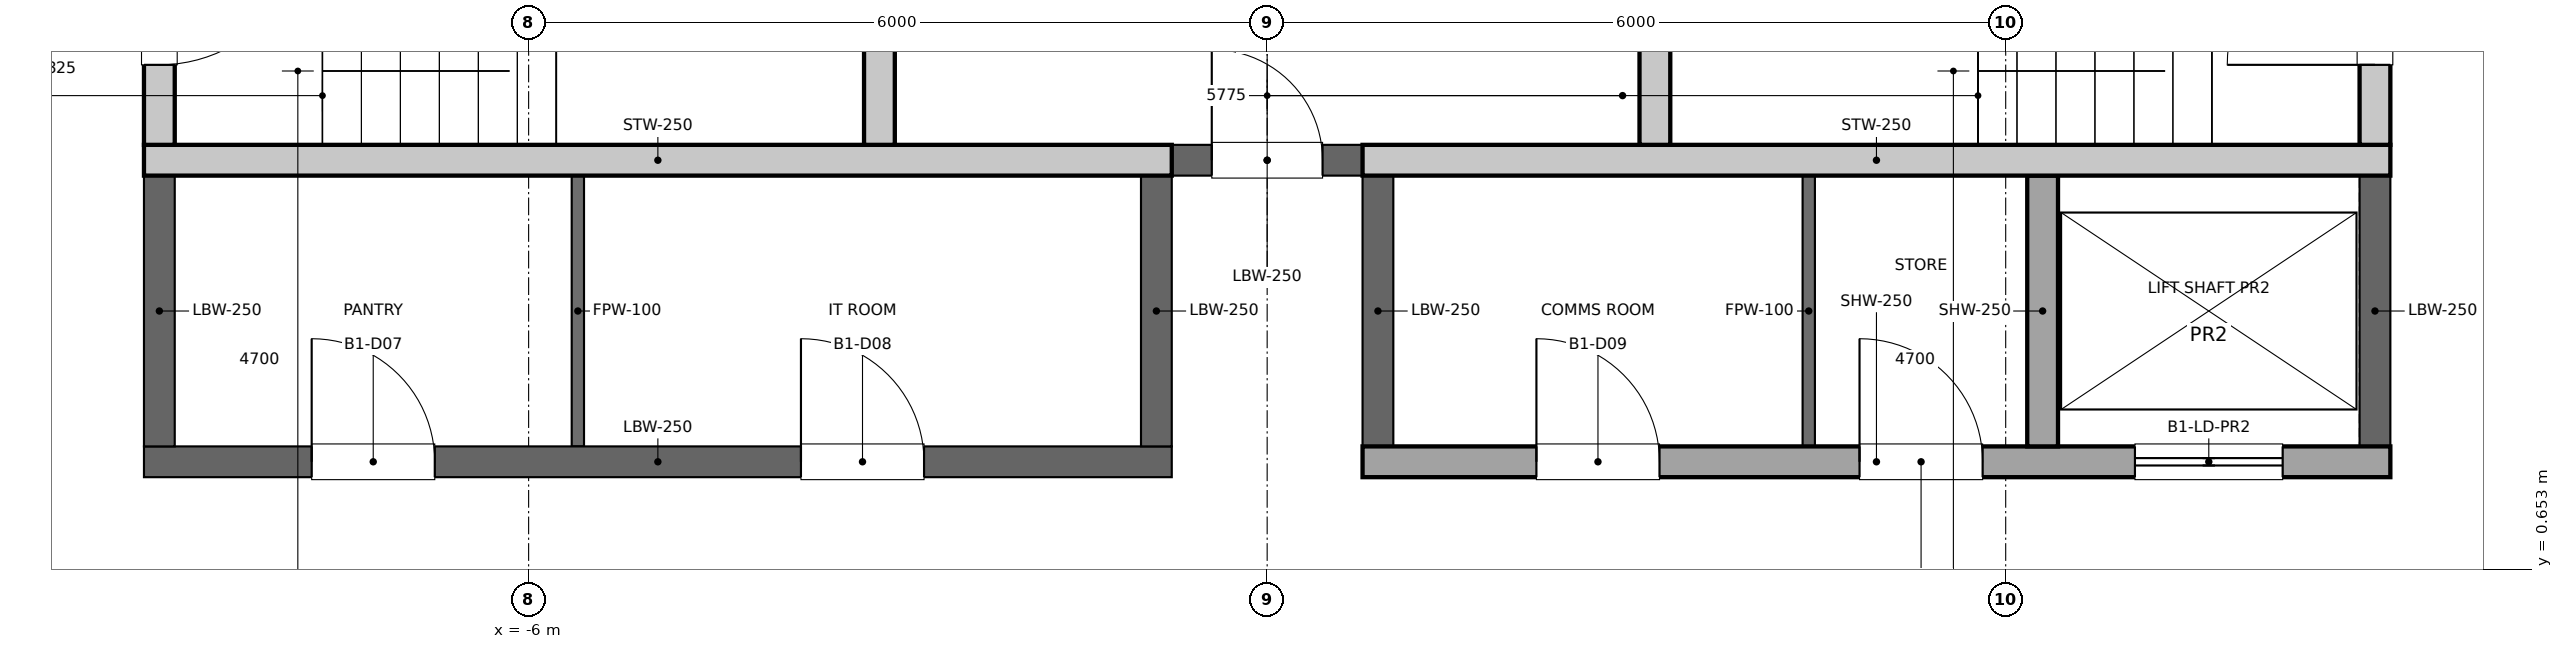
"""IFC4 building model, lengths in metres.
Left out: names, types, materials, properties, quantities, classifications, styles, units other than length and angle.
Written with IfcOpenShell. Run it as: python <this file> out.ifc"""

import sys

from ifc_helpers import new_model, si_unit, direction, frame, frame_2d, origin, place, context, subcontext, project, spatial, rectangle, extrude, element, fill, save


model = new_model("IFC4")
c1 = context("Model", 3, precision=1e-05, world=origin(), true_north=direction((0.0, 1.0)))
c2 = subcontext(c1, "Body", "Model", "MODEL_VIEW")
j1 = project(units=[si_unit("LENGTHUNIT", "METRE"), si_unit("PLANEANGLEUNIT", "RADIAN")], contexts=[c1])
p1 = place(None, origin())
s1 = spatial("IfcSite", under=j1, at=p1, CompositionType="ELEMENT")
p2 = place(p1, origin())
s2 = spatial("IfcBuilding", under=s1, at=p2, CompositionType="ELEMENT")
p3 = place(p2, frame((0.0, 0.0, -5.0)))
s3 = spatial("IfcBuildingStorey", under=s2, at=p3, CompositionType="ELEMENT", Elevation=-5.0)
p4 = place(p3, frame((-9.0, 4.1, 0.0), z_axis=(0.0, 0.0, 1.0), x_axis=(0.0, 1.0, 0.0)))
e1 = element("IfcWall", 1, at=p4, inside=s3, PredefinedType="SOLIDWALL", context=c2, shape_type="SweptSolid", body=[
    extrude(rectangle(XDim=2.5, YDim=0.25, at=frame_2d((1.25, 0.0))), origin(), (0.0, 0.0, 1.0), 4.7),
])
p5 = place(p4, frame((0.65, 0.0, 0.0)))
e2 = element("IfcOpeningElement", 2, at=p5, cuts=e1, PredefinedType="OPENING", context=c2, shape_type="SweptSolid", body=[
    extrude(rectangle(XDim=1.2, YDim=2.1, at=frame_2d((0.6, 1.05))), frame((0.0, 0.125, 0.0), z_axis=(0.0, -1.0, 0.0), x_axis=(1.0, 0.0, 0.0)), (0.0, 0.0, 1.0), 0.25),
])
p6 = place(p3, frame((9.0, 4.1, 0.0), z_axis=(0.0, 0.0, 1.0), x_axis=(0.0, 1.0, 0.0)))
e3 = element("IfcWall", 3, at=p6, inside=s3, PredefinedType="SOLIDWALL", context=c2, shape_type="SweptSolid", body=[
    extrude(rectangle(XDim=2.5, YDim=0.25, at=frame_2d((1.25, 0.0))), origin(), (0.0, 0.0, 1.0), 4.7),
])
p7 = place(p6, frame((0.65, 0.0, 0.0)))
e4 = element("IfcOpeningElement", 4, at=p7, cuts=e3, PredefinedType="OPENING", context=c2, shape_type="SweptSolid", body=[
    extrude(rectangle(XDim=1.2, YDim=2.1, at=frame_2d((0.6, 1.05))), frame((0.0, 0.125, 0.0), z_axis=(0.0, -1.0, 0.0), x_axis=(1.0, 0.0, 0.0)), (0.0, 0.0, 1.0), 0.25),
])
for number, where, z_axis, x_axis in (
    (5, (-3.15, 4.1, 0.0), (0.0, 0.0, 1.0), (0.0, 1.0, 0.0)),
    (6, (3.15, 4.1, 0.0), (0.0, 0.0, 1.0), (0.0, 1.0, 0.0)),
):
    element("IfcWall", number, at=place(p3, frame(where, z_axis=z_axis, x_axis=x_axis)), inside=s3, PredefinedType="SOLIDWALL", context=c2, shape_type="SweptSolid", body=[
        extrude(rectangle(XDim=2.5, YDim=0.25, at=frame_2d((1.25, 0.0))), origin(), (0.0, 0.0, 1.0), 4.7),
    ])
p8 = place(p3, frame((-0.775, 3.975, 0.0), z_axis=(0.0, 0.0, 1.0), x_axis=(1.0, 0.0, 0.0)))
e7 = element("IfcWall", 7, at=p8, inside=s3, PredefinedType="PARTITIONING", context=c2, shape_type="SweptSolid", body=[
    extrude(rectangle(XDim=1.55, YDim=0.25, at=frame_2d((0.775, 0.0))), origin(), (0.0, 0.0, 1.0), 4.7),
])
p9 = place(p8, frame((0.325, 0.0, 0.0)))
e8 = element("IfcOpeningElement", 8, at=p9, cuts=e7, PredefinedType="OPENING", context=c2, shape_type="SweptSolid", body=[
    extrude(rectangle(XDim=0.9, YDim=2.1, at=frame_2d((0.45, 1.05))), frame((0.0, 0.125, 0.0), z_axis=(0.0, -1.0, 0.0), x_axis=(1.0, 0.0, 0.0)), (0.0, 0.0, 1.0), 0.25),
])
p10 = place(p3, frame((-9.125, 1.525, 0.0), z_axis=(0.0, 0.0, 1.0), x_axis=(1.0, 0.0, 0.0)))
e9 = element("IfcWall", 9, at=p10, inside=s3, PredefinedType="PARTITIONING", context=c2, shape_type="SweptSolid", body=[
    extrude(rectangle(XDim=8.35, YDim=0.25, at=frame_2d((4.175, 0.0))), origin(), (0.0, 0.0, 1.0), 4.7),
])
p11 = place(p10, frame((1.363, 0.0, 0.0)))
e10 = element("IfcOpeningElement", 10, at=p11, cuts=e9, PredefinedType="OPENING", context=c2, shape_type="SweptSolid", body=[
    extrude(rectangle(XDim=1.0, YDim=2.1, at=frame_2d((0.5, 1.05))), frame((0.0, 0.125, 0.0), z_axis=(0.0, -1.0, 0.0), x_axis=(1.0, 0.0, 0.0)), (0.0, 0.0, 1.0), 0.25),
])
p12 = place(p10, frame((5.337, 0.0, 0.0)))
e11 = element("IfcOpeningElement", 11, at=p12, cuts=e9, PredefinedType="OPENING", context=c2, shape_type="SweptSolid", body=[
    extrude(rectangle(XDim=1.0, YDim=2.1, at=frame_2d((0.5, 1.05))), frame((0.0, 0.125, 0.0), z_axis=(0.0, -1.0, 0.0), x_axis=(1.0, 0.0, 0.0)), (0.0, 0.0, 1.0), 0.25),
])
p13 = place(p3, frame((0.775, 1.525, 0.0), z_axis=(0.0, 0.0, 1.0), x_axis=(1.0, 0.0, 0.0)))
e12 = element("IfcWall", 12, at=p13, inside=s3, PredefinedType="SOLIDWALL", context=c2, shape_type="SweptSolid", body=[
    extrude(rectangle(XDim=8.35, YDim=0.25, at=frame_2d((4.175, 0.0))), origin(), (0.0, 0.0, 1.0), 4.7),
])
p14 = place(p13, frame((6.275, 0.0, 0.0)))
e13 = element("IfcOpeningElement", 13, at=p14, cuts=e12, PredefinedType="OPENING", context=c2, shape_type="SweptSolid", body=[
    extrude(rectangle(XDim=1.2, YDim=2.1, at=frame_2d((0.6, 1.05))), frame((0.0, 0.125, 0.0), z_axis=(0.0, -1.0, 0.0), x_axis=(1.0, 0.0, 0.0)), (0.0, 0.0, 1.0), 0.25),
])
p15 = place(p13, frame((1.413, 0.0, 0.0)))
e14 = element("IfcOpeningElement", 14, at=p15, cuts=e12, PredefinedType="OPENING", context=c2, shape_type="SweptSolid", body=[
    extrude(rectangle(XDim=1.0, YDim=2.1, at=frame_2d((0.5, 1.05))), frame((0.0, 0.125, 0.0), z_axis=(0.0, -1.0, 0.0), x_axis=(1.0, 0.0, 0.0)), (0.0, 0.0, 1.0), 0.25),
])
p16 = place(p13, frame((4.038, 0.0, 0.0)))
e15 = element("IfcOpeningElement", 15, at=p16, cuts=e12, PredefinedType="OPENING", context=c2, shape_type="SweptSolid", body=[
    extrude(rectangle(XDim=1.0, YDim=2.1, at=frame_2d((0.5, 1.05))), frame((0.0, 0.125, 0.0), z_axis=(0.0, -1.0, 0.0), x_axis=(1.0, 0.0, 0.0)), (0.0, 0.0, 1.0), 0.25),
])
p17 = place(p3, frame((6.3, 1.65, 0.0), z_axis=(0.0, 0.0, 1.0), x_axis=(0.0, 1.0, 0.0)))
e16 = element("IfcWall", 16, at=p17, inside=s3, PredefinedType="SOLIDWALL", context=c2, shape_type="SweptSolid", body=[
    extrude(rectangle(XDim=2.2, YDim=0.25, at=frame_2d((1.1, 0.0))), origin(), (0.0, 0.0, 1.0), 4.7),
])
for number, where, z_axis, x_axis in (
    (17, (-9.125, 3.975, 0.0), (0.0, 0.0, 1.0), (1.0, 0.0, 0.0)),
    (18, (0.775, 3.975, 0.0), (0.0, 0.0, 1.0), (1.0, 0.0, 0.0)),
):
    element("IfcWall", number, at=place(p3, frame(where, z_axis=z_axis, x_axis=x_axis)), inside=s3, PredefinedType="SOLIDWALL", context=c2, shape_type="SweptSolid", body=[
        extrude(rectangle(XDim=8.35, YDim=0.25, at=frame_2d((4.175, 0.0))), origin(), (0.0, 0.0, 1.0), 4.7),
    ])
for number, where, z_axis, x_axis in (
    (19, (-9.0, 1.65, 0.0), (0.0, 0.0, 1.0), (0.0, 1.0, 0.0)),
    (20, (-0.9, 1.65, 0.0), (0.0, 0.0, 1.0), (0.0, 1.0, 0.0)),
    (21, (9.0, 1.65, 0.0), (0.0, 0.0, 1.0), (0.0, 1.0, 0.0)),
    (22, (0.9, 1.65, 0.0), (0.0, 0.0, 1.0), (0.0, 1.0, 0.0)),
):
    element("IfcWall", number, at=place(p3, frame(where, z_axis=z_axis, x_axis=x_axis)), inside=s3, PredefinedType="PARTITIONING", context=c2, shape_type="SweptSolid", body=[
        extrude(rectangle(XDim=2.2, YDim=0.25, at=frame_2d((1.1, 0.0))), origin(), (0.0, 0.0, 1.0), 4.7),
    ])
for number, where, z_axis, x_axis in (
    (23, (-5.6, 1.65, 0.0), (0.0, 0.0, 1.0), (0.0, 1.0, 0.0)),
    (24, (4.4, 1.65, 0.0), (0.0, 0.0, 1.0), (0.0, 1.0, 0.0)),
):
    element("IfcWall", number, at=place(p3, frame(where, z_axis=z_axis, x_axis=x_axis)), inside=s3, PredefinedType="PARTITIONING", context=c2, shape_type="SweptSolid", body=[
        extrude(rectangle(XDim=2.2, YDim=0.1, at=frame_2d((1.1, 0.0))), origin(), (0.0, 0.0, 1.0), 4.7),
    ])
p18 = place(p14, origin())
e25 = element("IfcDoor", 25, at=p18, inside=s3, OperationType="DOUBLE_DOOR_SLIDING", PredefinedType="DOOR", context=c2, shape_type="SweptSolid", body=[
    extrude(rectangle(XDim=1.2, YDim=2.1, at=frame_2d((0.6, 1.05))), frame((0.0, 0.025, 0.0), z_axis=(0.0, -1.0, 0.0), x_axis=(1.0, 0.0, 0.0)), (0.0, 0.0, 1.0), 0.05),
])
fill(e13, e25)
p19 = place(p5, origin())
e26 = element("IfcDoor", 26, at=p19, inside=s3, OperationType="SINGLE_SWING_RIGHT", PredefinedType="DOOR", context=c2, shape_type="SweptSolid", body=[
    extrude(rectangle(XDim=1.2, YDim=2.1, at=frame_2d((0.6, 1.05))), frame((0.0, 0.025, 0.0), z_axis=(0.0, -1.0, 0.0), x_axis=(1.0, 0.0, 0.0)), (0.0, 0.0, 1.0), 0.05),
])
fill(e2, e26)
p20 = place(p7, origin())
e27 = element("IfcDoor", 27, at=p20, inside=s3, OperationType="SINGLE_SWING_LEFT", PredefinedType="DOOR", context=c2, shape_type="SweptSolid", body=[
    extrude(rectangle(XDim=1.2, YDim=2.1, at=frame_2d((0.6, 1.05))), frame((0.0, 0.025, 0.0), z_axis=(0.0, -1.0, 0.0), x_axis=(1.0, 0.0, 0.0)), (0.0, 0.0, 1.0), 0.05),
])
fill(e4, e27)
p21 = place(p9, origin())
e28 = element("IfcDoor", 28, at=p21, inside=s3, OperationType="SINGLE_SWING_LEFT", PredefinedType="DOOR", context=c2, shape_type="SweptSolid", body=[
    extrude(rectangle(XDim=0.9, YDim=2.1, at=frame_2d((0.45, 1.05))), frame((0.0, 0.025, 0.0), z_axis=(0.0, -1.0, 0.0), x_axis=(1.0, 0.0, 0.0)), (0.0, 0.0, 1.0), 0.05),
])
fill(e8, e28)
p22 = place(p11, origin())
e29 = element("IfcDoor", 29, at=p22, inside=s3, OperationType="SINGLE_SWING_LEFT", PredefinedType="DOOR", context=c2, shape_type="SweptSolid", body=[
    extrude(rectangle(XDim=1.0, YDim=2.1, at=frame_2d((0.5, 1.05))), frame((0.0, 0.025, 0.0), z_axis=(0.0, -1.0, 0.0), x_axis=(1.0, 0.0, 0.0)), (0.0, 0.0, 1.0), 0.05),
])
fill(e10, e29)
p23 = place(p12, origin())
e30 = element("IfcDoor", 30, at=p23, inside=s3, OperationType="SINGLE_SWING_LEFT", PredefinedType="DOOR", context=c2, shape_type="SweptSolid", body=[
    extrude(rectangle(XDim=1.0, YDim=2.1, at=frame_2d((0.5, 1.05))), frame((0.0, 0.025, 0.0), z_axis=(0.0, -1.0, 0.0), x_axis=(1.0, 0.0, 0.0)), (0.0, 0.0, 1.0), 0.05),
])
fill(e11, e30)
p24 = place(p15, origin())
e31 = element("IfcDoor", 31, at=p24, inside=s3, OperationType="SINGLE_SWING_LEFT", PredefinedType="DOOR", context=c2, shape_type="SweptSolid", body=[
    extrude(rectangle(XDim=1.0, YDim=2.1, at=frame_2d((0.5, 1.05))), frame((0.0, 0.025, 0.0), z_axis=(0.0, -1.0, 0.0), x_axis=(1.0, 0.0, 0.0)), (0.0, 0.0, 1.0), 0.05),
])
fill(e14, e31)
p25 = place(p16, origin())
e32 = element("IfcDoor", 32, at=p25, inside=s3, OperationType="SINGLE_SWING_LEFT", PredefinedType="DOOR", context=c2, shape_type="SweptSolid", body=[
    extrude(rectangle(XDim=1.0, YDim=2.1, at=frame_2d((0.5, 1.05))), frame((0.0, 0.025, 0.0), z_axis=(0.0, -1.0, 0.0), x_axis=(1.0, 0.0, 0.0)), (0.0, 0.0, 1.0), 0.05),
])
fill(e15, e32)
save(model, sys.argv[1])
